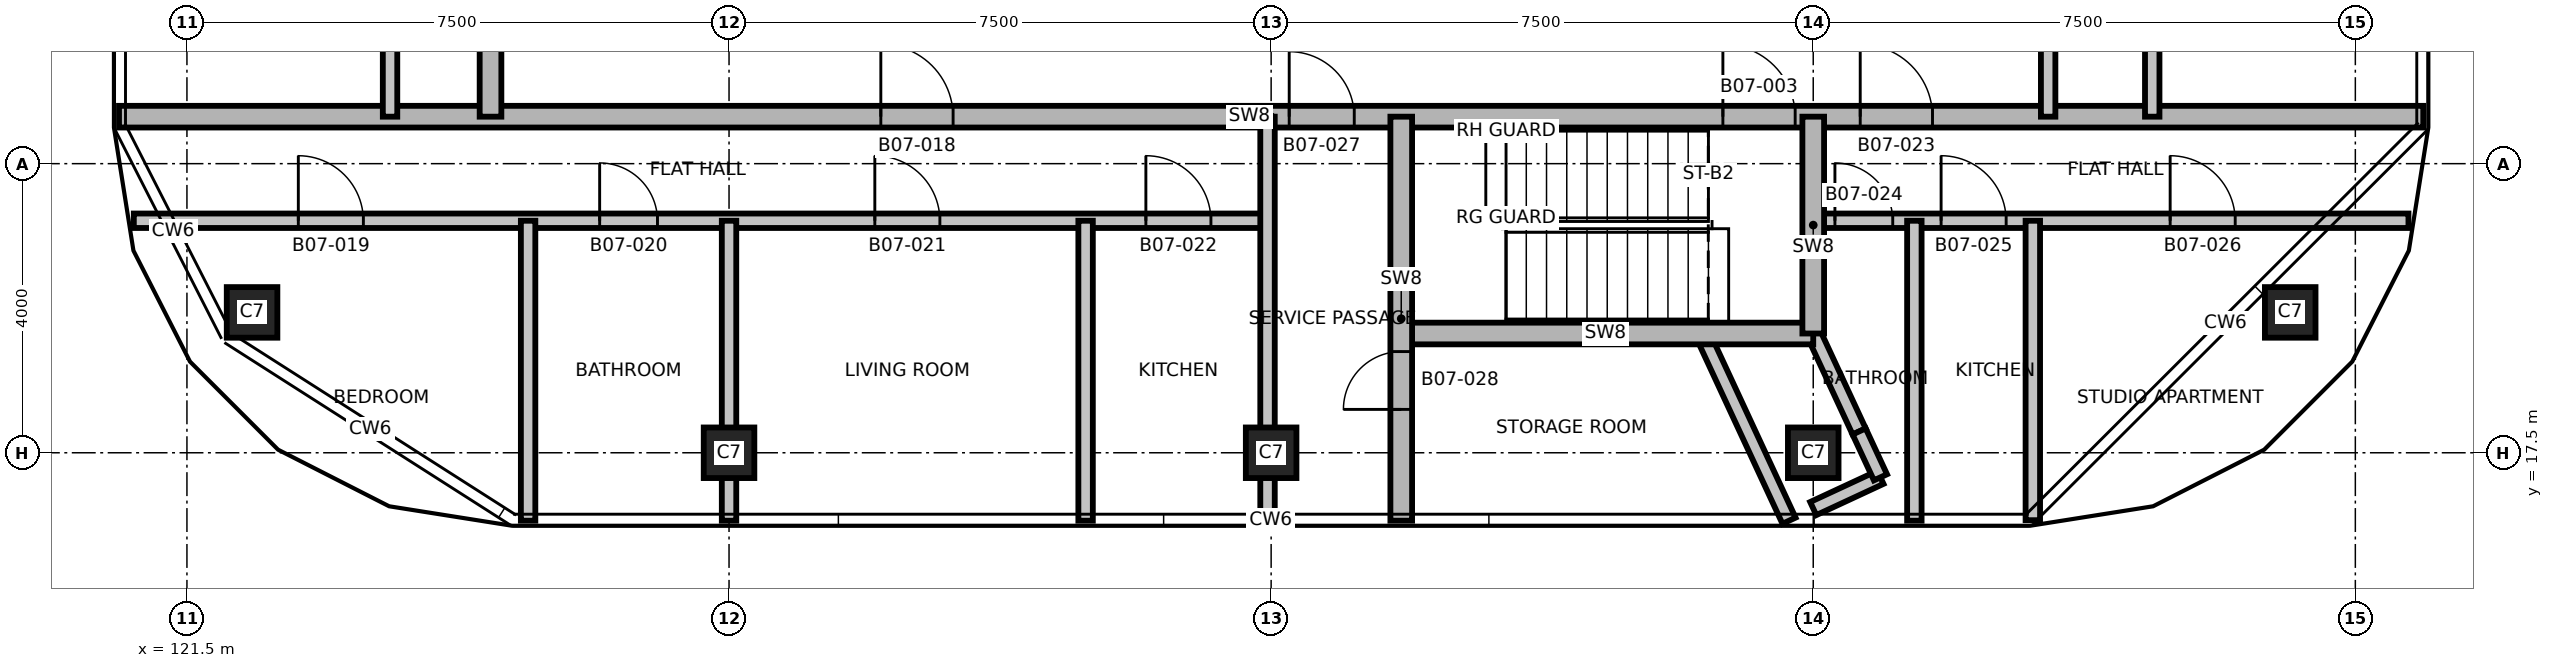
"""IFC4 building model, lengths in metres.
Left out: names, types, materials, properties, quantities, classifications, styles, units other than length and angle.
Written with IfcOpenShell. Run it as: python <this file> out.ifc"""

import sys

from ifc_helpers import new_model, si_unit, direction, frame, frame_2d, origin, origin_2d, place, context, subcontext, project, spatial, rectangle, extrude, element, fill, save


model = new_model("IFC4")
c1 = context("Model", 3, precision=1e-05, world=origin(), true_north=direction((0.0, 1.0)))
c2 = subcontext(c1, "Body", "Model", "MODEL_VIEW")
j1 = project(units=[si_unit("LENGTHUNIT", "METRE"), si_unit("PLANEANGLEUNIT", "RADIAN")], contexts=[c1])
p1 = place(None, origin())
s1 = spatial("IfcSite", under=j1, at=p1, CompositionType="ELEMENT")
p2 = place(p1, origin())
s2 = spatial("IfcBuilding", under=s1, at=p2, CompositionType="ELEMENT")
p3 = place(p2, frame((0.0, 0.0, 87.1)))
s3 = spatial("IfcBuildingStorey", under=s2, at=p3, CompositionType="ELEMENT", Elevation=87.1)
for number, where, z_axis, x_axis in (
    (1, (129.0, 17.5, 0.0), (0.0, 0.0, 1.0), (1.0, 0.0, 0.0)),
    (2, (136.5, 17.5, 0.0), (0.0, 0.0, 1.0), (1.0, 0.0, 0.0)),
    (3, (144.0, 17.5, 0.0), (0.0, 0.0, 1.0), (1.0, 0.0, 0.0)),
    (4, (122.401, 19.442, 0.0), (0.0, 0.0, 1.0), (1.0, 0.0, 0.0)),
    (5, (150.599, 19.442, 0.0), (0.0, 0.0, 1.0), (1.0, 0.0, 0.0)),
):
    element("IfcColumn", number, at=place(p3, frame(where, z_axis=z_axis, x_axis=x_axis)), inside=s3, PredefinedType="COLUMN", context=c2, shape_type="SweptSolid", body=[
        extrude(rectangle(XDim=0.7, YDim=0.7, at=origin_2d()), origin(), (0.0, 0.0, 1.0), 3.7),
    ])
p4 = place(p3, frame((142.463, 19.15, 0.0), z_axis=(0.0, 0.0, 1.0), x_axis=(0.421030913131, -0.90704628889, 0.0)))
e6 = element("IfcWall", 6, at=p4, inside=s3, PredefinedType="PARTITIONING", context=c2, shape_type="SweptSolid", body=[
    extrude(rectangle(XDim=2.855, YDim=0.2, at=frame_2d((1.428, 0.0))), origin(), (0.0, 0.0, 1.0), 3.4),
])
p5 = place(p3, frame((144.0, 16.728, 0.0), z_axis=(0.0, 0.0, 1.0), x_axis=(0.906960240365, 0.42121624185, 0.0)))
e7 = element("IfcWall", 7, at=p5, inside=s3, PredefinedType="PARTITIONING", context=c2, shape_type="SweptSolid", body=[
    extrude(rectangle(XDim=1.025, YDim=0.2, at=frame_2d((0.513, 0.0))), origin(), (0.0, 0.0, 1.0), 3.4),
])
p6 = place(p3, frame((144.0, 19.163, 0.0), z_axis=(0.0, 0.0, 1.0), x_axis=(0.420997169079, -0.907061951372, 0.0)))
e8 = element("IfcWall", 8, at=p6, inside=s3, PredefinedType="PARTITIONING", context=c2, shape_type="SweptSolid", body=[
    extrude(rectangle(XDim=1.508, YDim=0.2, at=frame_2d((0.754, 0.0))), origin(), (0.0, 0.0, 1.0), 3.4),
])
p7 = place(p3, frame((144.635, 17.795, 0.0), z_axis=(0.0, 0.0, 1.0), x_axis=(0.421223998033, -0.906956638148, 0.0)))
e9 = element("IfcWall", 9, at=p7, inside=s3, PredefinedType="PARTITIONING", context=c2, shape_type="SweptSolid", body=[
    extrude(rectangle(XDim=0.7, YDim=0.2, at=frame_2d((0.35, 0.0))), origin(), (0.0, 0.0, 1.0), 3.4),
])
p8 = place(p3, frame((138.25, 19.15, 0.0), z_axis=(0.0, 0.0, 1.0), x_axis=(1.0, 0.0, 0.0)))
e10 = element("IfcWall", 10, at=p8, inside=s3, PredefinedType="SHEAR", context=c2, shape_type="SweptSolid", body=[
    extrude(rectangle(XDim=5.75, YDim=0.3, at=frame_2d((2.875, 0.0))), origin(), (0.0, 0.0, 1.0), 3.4),
])
p9 = place(p3, frame((120.765, 20.71, 0.0), z_axis=(0.0, 0.0, 1.0), x_axis=(1.0, 0.0, 0.0)))
e11 = element("IfcWall", 11, at=p9, inside=s3, PredefinedType="PARTITIONING", context=c2, shape_type="SweptSolid", body=[
    extrude(rectangle(XDim=15.735, YDim=0.2, at=frame_2d((7.868, 0.0))), origin(), (0.0, 0.0, 1.0), 3.4),
])
p10 = place(p9, frame((2.276, 0.0, 0.0)))
e12 = element("IfcOpeningElement", 12, at=p10, cuts=e11, PredefinedType="OPENING", context=c2, shape_type="SweptSolid", body=[
    extrude(rectangle(XDim=0.9, YDim=2.1, at=frame_2d((0.45, 1.05))), frame((0.0, 0.11, 0.0), z_axis=(0.0, -1.0, 0.0), x_axis=(1.0, 0.0, 0.0)), (0.0, 0.0, 1.0), 0.22),
])
p11 = place(p9, frame((6.445, 0.0, 0.0)))
e13 = element("IfcOpeningElement", 13, at=p11, cuts=e11, PredefinedType="OPENING", context=c2, shape_type="SweptSolid", body=[
    extrude(rectangle(XDim=0.8, YDim=2.1, at=frame_2d((0.4, 1.05))), frame((0.0, 0.11, 0.0), z_axis=(0.0, -1.0, 0.0), x_axis=(1.0, 0.0, 0.0)), (0.0, 0.0, 1.0), 0.22),
])
p12 = place(p9, frame((10.252, 0.0, 0.0)))
e14 = element("IfcOpeningElement", 14, at=p12, cuts=e11, PredefinedType="OPENING", context=c2, shape_type="SweptSolid", body=[
    extrude(rectangle(XDim=0.9, YDim=2.1, at=frame_2d((0.45, 1.05))), frame((0.0, 0.11, 0.0), z_axis=(0.0, -1.0, 0.0), x_axis=(1.0, 0.0, 0.0)), (0.0, 0.0, 1.0), 0.22),
])
p13 = place(p9, frame((14.002, 0.0, 0.0)))
e15 = element("IfcOpeningElement", 15, at=p13, cuts=e11, PredefinedType="OPENING", context=c2, shape_type="SweptSolid", body=[
    extrude(rectangle(XDim=0.9, YDim=2.1, at=frame_2d((0.45, 1.05))), frame((0.0, 0.11, 0.0), z_axis=(0.0, -1.0, 0.0), x_axis=(1.0, 0.0, 0.0)), (0.0, 0.0, 1.0), 0.22),
])
p14 = place(p3, frame((144.0, 20.71, 0.0), z_axis=(0.0, 0.0, 1.0), x_axis=(1.0, 0.0, 0.0)))
e16 = element("IfcWall", 16, at=p14, inside=s3, PredefinedType="PARTITIONING", context=c2, shape_type="SweptSolid", body=[
    extrude(rectangle(XDim=8.235, YDim=0.2, at=frame_2d((4.118, 0.0))), origin(), (0.0, 0.0, 1.0), 3.4),
])
p15 = place(p14, frame((0.3, 0.0, 0.0)))
e17 = element("IfcOpeningElement", 17, at=p15, cuts=e16, PredefinedType="OPENING", context=c2, shape_type="SweptSolid", body=[
    extrude(rectangle(XDim=0.8, YDim=2.1, at=frame_2d((0.4, 1.05))), frame((0.0, 0.11, 0.0), z_axis=(0.0, -1.0, 0.0), x_axis=(1.0, 0.0, 0.0)), (0.0, 0.0, 1.0), 0.22),
])
p16 = place(p14, frame((1.769, 0.0, 0.0)))
e18 = element("IfcOpeningElement", 18, at=p16, cuts=e16, PredefinedType="OPENING", context=c2, shape_type="SweptSolid", body=[
    extrude(rectangle(XDim=0.9, YDim=2.1, at=frame_2d((0.45, 1.05))), frame((0.0, 0.11, 0.0), z_axis=(0.0, -1.0, 0.0), x_axis=(1.0, 0.0, 0.0)), (0.0, 0.0, 1.0), 0.22),
])
p17 = place(p14, frame((4.938, 0.0, 0.0)))
e19 = element("IfcOpeningElement", 19, at=p17, cuts=e16, PredefinedType="OPENING", context=c2, shape_type="SweptSolid", body=[
    extrude(rectangle(XDim=0.9, YDim=2.1, at=frame_2d((0.45, 1.05))), frame((0.0, 0.11, 0.0), z_axis=(0.0, -1.0, 0.0), x_axis=(1.0, 0.0, 0.0)), (0.0, 0.0, 1.0), 0.22),
])
p18 = place(p3, frame((120.56, 22.15, 0.0), z_axis=(0.0, 0.0, 1.0), x_axis=(1.0, 0.0, 0.0)))
e20 = element("IfcWall", 20, at=p18, inside=s3, PredefinedType="SHEAR", context=c2, shape_type="SweptSolid", body=[
    extrude(rectangle(XDim=31.88, YDim=0.3, at=frame_2d((15.94, 0.0))), origin(), (0.0, 0.0, 1.0), 3.4),
])
p19 = place(p18, frame((22.19, 0.0, 0.0)))
e21 = element("IfcOpeningElement", 21, at=p19, cuts=e20, PredefinedType="OPENING", context=c2, shape_type="SweptSolid", body=[
    extrude(rectangle(XDim=1.0, YDim=2.1, at=frame_2d((0.5, 1.05))), frame((0.0, 0.16, 0.0), z_axis=(0.0, -1.0, 0.0), x_axis=(1.0, 0.0, 0.0)), (0.0, 0.0, 1.0), 0.32),
])
p20 = place(p18, frame((10.54, 0.0, 0.0)))
e22 = element("IfcOpeningElement", 22, at=p20, cuts=e20, PredefinedType="OPENING", context=c2, shape_type="SweptSolid", body=[
    extrude(rectangle(XDim=1.0, YDim=2.1, at=frame_2d((0.5, 1.05))), frame((0.0, 0.16, 0.0), z_axis=(0.0, -1.0, 0.0), x_axis=(1.0, 0.0, 0.0)), (0.0, 0.0, 1.0), 0.32),
])
p21 = place(p18, frame((24.09, 0.0, 0.0)))
e23 = element("IfcOpeningElement", 23, at=p21, cuts=e20, PredefinedType="OPENING", context=c2, shape_type="SweptSolid", body=[
    extrude(rectangle(XDim=1.0, YDim=2.1, at=frame_2d((0.5, 1.05))), frame((0.0, 0.16, 0.0), z_axis=(0.0, -1.0, 0.0), x_axis=(1.0, 0.0, 0.0)), (0.0, 0.0, 1.0), 0.32),
])
p22 = place(p18, frame((16.19, 0.0, 0.0)))
e24 = element("IfcOpeningElement", 24, at=p22, cuts=e20, PredefinedType="OPENING", context=c2, shape_type="SweptSolid", body=[
    extrude(rectangle(XDim=0.9, YDim=2.1, at=frame_2d((0.45, 1.05))), frame((0.0, 0.16, 0.0), z_axis=(0.0, -1.0, 0.0), x_axis=(1.0, 0.0, 0.0)), (0.0, 0.0, 1.0), 0.32),
])
p23 = place(p3, frame((124.31, 22.15, 0.0), z_axis=(0.0, 0.0, 1.0), x_axis=(0.0, 1.0, 0.0)))
e25 = element("IfcWall", 25, at=p23, inside=s3, PredefinedType="PARTITIONING", context=c2, shape_type="SweptSolid", body=[
    extrude(rectangle(XDim=17.7, YDim=0.2, at=frame_2d((8.85, 0.0))), origin(), (0.0, 0.0, 1.0), 3.4),
])
p24 = place(p23, frame((1.725, 0.0, 0.0)))
e26 = element("IfcOpeningElement", 26, at=p24, cuts=e25, PredefinedType="OPENING", context=c2, shape_type="SweptSolid", body=[
    extrude(rectangle(XDim=0.9, YDim=2.1, at=frame_2d((0.45, 1.05))), frame((0.0, 0.11, 0.0), z_axis=(0.0, -1.0, 0.0), x_axis=(1.0, 0.0, 0.0)), (0.0, 0.0, 1.0), 0.22),
])
p25 = place(p23, frame((6.867, 0.0, 0.0)))
e27 = element("IfcOpeningElement", 27, at=p25, cuts=e25, PredefinedType="OPENING", context=c2, shape_type="SweptSolid", body=[
    extrude(rectangle(XDim=0.9, YDim=2.1, at=frame_2d((0.45, 1.05))), frame((0.0, 0.11, 0.0), z_axis=(0.0, -1.0, 0.0), x_axis=(1.0, 0.0, 0.0)), (0.0, 0.0, 1.0), 0.22),
])
p26 = place(p23, frame((11.367, 0.0, 0.0)))
e28 = element("IfcOpeningElement", 28, at=p26, cuts=e25, PredefinedType="OPENING", context=c2, shape_type="SweptSolid", body=[
    extrude(rectangle(XDim=0.9, YDim=2.1, at=frame_2d((0.45, 1.05))), frame((0.0, 0.11, 0.0), z_axis=(0.0, -1.0, 0.0), x_axis=(1.0, 0.0, 0.0)), (0.0, 0.0, 1.0), 0.22),
])
p27 = place(p23, frame((14.378, 0.0, 0.0)))
e29 = element("IfcOpeningElement", 29, at=p27, cuts=e25, PredefinedType="OPENING", context=c2, shape_type="SweptSolid", body=[
    extrude(rectangle(XDim=0.9, YDim=2.1, at=frame_2d((0.45, 1.05))), frame((0.0, 0.11, 0.0), z_axis=(0.0, -1.0, 0.0), x_axis=(1.0, 0.0, 0.0)), (0.0, 0.0, 1.0), 0.22),
])
p28 = place(p23, frame((16.603, 0.0, 0.0)))
e30 = element("IfcOpeningElement", 30, at=p28, cuts=e25, PredefinedType="OPENING", context=c2, shape_type="SweptSolid", body=[
    extrude(rectangle(XDim=0.8, YDim=2.1, at=frame_2d((0.4, 1.05))), frame((0.0, 0.11, 0.0), z_axis=(0.0, -1.0, 0.0), x_axis=(1.0, 0.0, 0.0)), (0.0, 0.0, 1.0), 0.22),
])
p29 = place(p3, frame((125.7, 22.15, 0.0), z_axis=(0.0, 0.0, 1.0), x_axis=(0.0, 1.0, 0.0)))
e31 = element("IfcWall", 31, at=p29, inside=s3, PredefinedType="SHEAR", context=c2, shape_type="SweptSolid", body=[
    extrude(rectangle(XDim=17.7, YDim=0.3, at=frame_2d((8.85, 0.0))), origin(), (0.0, 0.0, 1.0), 3.4),
])
p30 = place(p29, frame((2.7, 0.0, 0.0)))
e32 = element("IfcOpeningElement", 32, at=p30, cuts=e31, PredefinedType="OPENING", context=c2, shape_type="SweptSolid", body=[
    extrude(rectangle(XDim=1.0, YDim=2.1, at=frame_2d((0.5, 1.05))), frame((0.0, 0.16, 0.0), z_axis=(0.0, -1.0, 0.0), x_axis=(1.0, 0.0, 0.0)), (0.0, 0.0, 1.0), 0.32),
])
for number, where, z_axis, x_axis in (
    (33, (126.22, 16.56, 0.0), (0.0, 0.0, 1.0), (0.0, 1.0, 0.0)),
    (34, (129.0, 16.56, 0.0), (0.0, 0.0, 1.0), (0.0, 1.0, 0.0)),
    (35, (133.933, 16.56, 0.0), (0.0, 0.0, 1.0), (0.0, 1.0, 0.0)),
):
    element("IfcWall", number, at=place(p3, frame(where, z_axis=z_axis, x_axis=x_axis)), inside=s3, PredefinedType="PARTITIONING", context=c2, shape_type="SweptSolid", body=[
        extrude(rectangle(XDim=4.15, YDim=0.2, at=frame_2d((2.075, 0.0))), origin(), (0.0, 0.0, 1.0), 3.4),
    ])
p31 = place(p3, frame((136.45, 16.56, 0.0), z_axis=(0.0, 0.0, 1.0), x_axis=(0.0, 1.0, 0.0)))
e36 = element("IfcWall", 36, at=p31, inside=s3, PredefinedType="PARTITIONING", context=c2, shape_type="SweptSolid", body=[
    extrude(rectangle(XDim=5.59, YDim=0.2, at=frame_2d((2.795, 0.0))), origin(), (0.0, 0.0, 1.0), 3.4),
])
p32 = place(p3, frame((138.3, 16.56, 0.0), z_axis=(0.0, 0.0, 1.0), x_axis=(0.0, 1.0, 0.0)))
e37 = element("IfcWall", 37, at=p32, inside=s3, PredefinedType="SHEAR", context=c2, shape_type="SweptSolid", body=[
    extrude(rectangle(XDim=5.59, YDim=0.3, at=frame_2d((2.795, 0.0))), origin(), (0.0, 0.0, 1.0), 3.4),
])
p33 = place(p32, frame((1.54, 0.0, 0.0)))
e38 = element("IfcOpeningElement", 38, at=p33, cuts=e37, PredefinedType="OPENING", context=c2, shape_type="SweptSolid", body=[
    extrude(rectangle(XDim=0.8, YDim=2.1, at=frame_2d((0.4, 1.05))), frame((0.0, 0.16, 0.0), z_axis=(0.0, -1.0, 0.0), x_axis=(1.0, 0.0, 0.0)), (0.0, 0.0, 1.0), 0.32),
])
p34 = place(p3, frame((144.0, 19.15, 0.0), z_axis=(0.0, 0.0, 1.0), x_axis=(0.0, 1.0, 0.0)))
e39 = element("IfcWall", 39, at=p34, inside=s3, PredefinedType="SHEAR", context=c2, shape_type="SweptSolid", body=[
    extrude(rectangle(XDim=3.0, YDim=0.3, at=frame_2d((1.5, 0.0))), origin(), (0.0, 0.0, 1.0), 3.4),
])
p35 = place(p3, frame((145.399, 16.56, 0.0), z_axis=(0.0, 0.0, 1.0), x_axis=(0.0, 1.0, 0.0)))
e40 = element("IfcWall", 40, at=p35, inside=s3, PredefinedType="PARTITIONING", context=c2, shape_type="SweptSolid", body=[
    extrude(rectangle(XDim=4.15, YDim=0.2, at=frame_2d((2.075, 0.0))), origin(), (0.0, 0.0, 1.0), 3.4),
])
p36 = place(p3, frame((147.038, 16.567, 0.0), z_axis=(0.0, 0.0, 1.0), x_axis=(0.0, 1.0, 0.0)))
e41 = element("IfcWall", 41, at=p36, inside=s3, PredefinedType="PARTITIONING", context=c2, shape_type="SweptSolid", body=[
    extrude(rectangle(XDim=4.143, YDim=0.2, at=frame_2d((2.072, 0.0))), origin(), (0.0, 0.0, 1.0), 3.4),
])
p37 = place(p3, frame((147.25, 22.15, 0.0), z_axis=(0.0, 0.0, 1.0), x_axis=(0.0, 1.0, 0.0)))
e42 = element("IfcWall", 42, at=p37, inside=s3, PredefinedType="PARTITIONING", context=c2, shape_type="SweptSolid", body=[
    extrude(rectangle(XDim=17.7, YDim=0.2, at=frame_2d((8.85, 0.0))), origin(), (0.0, 0.0, 1.0), 3.4),
])
p38 = place(p37, frame((2.65, 0.0, 0.0)))
e43 = element("IfcOpeningElement", 43, at=p38, cuts=e42, PredefinedType="OPENING", context=c2, shape_type="SweptSolid", body=[
    extrude(rectangle(XDim=1.0, YDim=2.1, at=frame_2d((0.5, 1.05))), frame((0.0, 0.11, 0.0), z_axis=(0.0, -1.0, 0.0), x_axis=(1.0, 0.0, 0.0)), (0.0, 0.0, 1.0), 0.22),
])
p39 = place(p3, frame((148.69, 22.15, 0.0), z_axis=(0.0, 0.0, 1.0), x_axis=(0.0, 1.0, 0.0)))
e44 = element("IfcWall", 44, at=p39, inside=s3, PredefinedType="PARTITIONING", context=c2, shape_type="SweptSolid", body=[
    extrude(rectangle(XDim=17.7, YDim=0.2, at=frame_2d((8.85, 0.0))), origin(), (0.0, 0.0, 1.0), 3.4),
])
p40 = place(p39, frame((1.028, 0.0, 0.0)))
e45 = element("IfcOpeningElement", 45, at=p40, cuts=e44, PredefinedType="OPENING", context=c2, shape_type="SweptSolid", body=[
    extrude(rectangle(XDim=0.9, YDim=2.1, at=frame_2d((0.45, 1.05))), frame((0.0, 0.11, 0.0), z_axis=(0.0, -1.0, 0.0), x_axis=(1.0, 0.0, 0.0)), (0.0, 0.0, 1.0), 0.22),
])
p41 = place(p39, frame((3.253, 0.0, 0.0)))
e46 = element("IfcOpeningElement", 46, at=p41, cuts=e44, PredefinedType="OPENING", context=c2, shape_type="SweptSolid", body=[
    extrude(rectangle(XDim=0.8, YDim=2.1, at=frame_2d((0.4, 1.05))), frame((0.0, 0.11, 0.0), z_axis=(0.0, -1.0, 0.0), x_axis=(1.0, 0.0, 0.0)), (0.0, 0.0, 1.0), 0.22),
])
p42 = place(p39, frame((6.867, 0.0, 0.0)))
e47 = element("IfcOpeningElement", 47, at=p42, cuts=e44, PredefinedType="OPENING", context=c2, shape_type="SweptSolid", body=[
    extrude(rectangle(XDim=0.9, YDim=2.1, at=frame_2d((0.45, 1.05))), frame((0.0, 0.11, 0.0), z_axis=(0.0, -1.0, 0.0), x_axis=(1.0, 0.0, 0.0)), (0.0, 0.0, 1.0), 0.22),
])
p43 = place(p39, frame((11.367, 0.0, 0.0)))
e48 = element("IfcOpeningElement", 48, at=p43, cuts=e44, PredefinedType="OPENING", context=c2, shape_type="SweptSolid", body=[
    extrude(rectangle(XDim=0.9, YDim=2.1, at=frame_2d((0.45, 1.05))), frame((0.0, 0.11, 0.0), z_axis=(0.0, -1.0, 0.0), x_axis=(1.0, 0.0, 0.0)), (0.0, 0.0, 1.0), 0.22),
])
p44 = place(p39, frame((15.075, 0.0, 0.0)))
e49 = element("IfcOpeningElement", 49, at=p44, cuts=e44, PredefinedType="OPENING", context=c2, shape_type="SweptSolid", body=[
    extrude(rectangle(XDim=0.9, YDim=2.1, at=frame_2d((0.45, 1.05))), frame((0.0, 0.11, 0.0), z_axis=(0.0, -1.0, 0.0), x_axis=(1.0, 0.0, 0.0)), (0.0, 0.0, 1.0), 0.22),
])
p45 = place(p19, origin())
e50 = element("IfcDoor", 50, at=p45, inside=s3, OperationType="SINGLE_SWING_LEFT", PredefinedType="DOOR", context=c2, shape_type="SweptSolid", body=[
    extrude(rectangle(XDim=1.0, YDim=2.1, at=frame_2d((0.5, 1.05))), frame((0.0, 0.025, 0.0), z_axis=(0.0, -1.0, 0.0), x_axis=(1.0, 0.0, 0.0)), (0.0, 0.0, 1.0), 0.05),
])
fill(e21, e50)
p46 = place(p20, origin())
e51 = element("IfcDoor", 51, at=p46, inside=s3, OperationType="SINGLE_SWING_RIGHT", PredefinedType="DOOR", context=c2, shape_type="SweptSolid", body=[
    extrude(rectangle(XDim=1.0, YDim=2.1, at=frame_2d((0.5, 1.05))), frame((0.0, 0.025, 0.0), z_axis=(0.0, -1.0, 0.0), x_axis=(1.0, 0.0, 0.0)), (0.0, 0.0, 1.0), 0.05),
])
fill(e22, e51)
p47 = place(p10, origin())
e52 = element("IfcDoor", 52, at=p47, inside=s3, OperationType="SINGLE_SWING_LEFT", PredefinedType="DOOR", context=c2, shape_type="SweptSolid", body=[
    extrude(rectangle(XDim=0.9, YDim=2.1, at=frame_2d((0.45, 1.05))), frame((0.0, 0.025, 0.0), z_axis=(0.0, -1.0, 0.0), x_axis=(1.0, 0.0, 0.0)), (0.0, 0.0, 1.0), 0.05),
])
fill(e12, e52)
p48 = place(p11, origin())
e53 = element("IfcDoor", 53, at=p48, inside=s3, OperationType="SINGLE_SWING_RIGHT", PredefinedType="DOOR", context=c2, shape_type="SweptSolid", body=[
    extrude(rectangle(XDim=0.8, YDim=2.1, at=frame_2d((0.4, 1.05))), frame((0.0, 0.025, 0.0), z_axis=(0.0, -1.0, 0.0), x_axis=(1.0, 0.0, 0.0)), (0.0, 0.0, 1.0), 0.05),
])
fill(e13, e53)
p49 = place(p12, origin())
e54 = element("IfcDoor", 54, at=p49, inside=s3, OperationType="SINGLE_SWING_LEFT", PredefinedType="DOOR", context=c2, shape_type="SweptSolid", body=[
    extrude(rectangle(XDim=0.9, YDim=2.1, at=frame_2d((0.45, 1.05))), frame((0.0, 0.025, 0.0), z_axis=(0.0, -1.0, 0.0), x_axis=(1.0, 0.0, 0.0)), (0.0, 0.0, 1.0), 0.05),
])
fill(e14, e54)
p50 = place(p13, origin())
e55 = element("IfcDoor", 55, at=p50, inside=s3, OperationType="SINGLE_SWING_RIGHT", PredefinedType="DOOR", context=c2, shape_type="SweptSolid", body=[
    extrude(rectangle(XDim=0.9, YDim=2.1, at=frame_2d((0.45, 1.05))), frame((0.0, 0.025, 0.0), z_axis=(0.0, -1.0, 0.0), x_axis=(1.0, 0.0, 0.0)), (0.0, 0.0, 1.0), 0.05),
])
fill(e15, e55)
p51 = place(p21, origin())
e56 = element("IfcDoor", 56, at=p51, inside=s3, OperationType="SINGLE_SWING_LEFT", PredefinedType="DOOR", context=c2, shape_type="SweptSolid", body=[
    extrude(rectangle(XDim=1.0, YDim=2.1, at=frame_2d((0.5, 1.05))), frame((0.0, 0.025, 0.0), z_axis=(0.0, -1.0, 0.0), x_axis=(1.0, 0.0, 0.0)), (0.0, 0.0, 1.0), 0.05),
])
fill(e23, e56)
p52 = place(p15, origin())
e57 = element("IfcDoor", 57, at=p52, inside=s3, OperationType="SINGLE_SWING_RIGHT", PredefinedType="DOOR", context=c2, shape_type="SweptSolid", body=[
    extrude(rectangle(XDim=0.8, YDim=2.1, at=frame_2d((0.4, 1.05))), frame((0.0, 0.025, 0.0), z_axis=(0.0, -1.0, 0.0), x_axis=(1.0, 0.0, 0.0)), (0.0, 0.0, 1.0), 0.05),
])
fill(e17, e57)
p53 = place(p16, origin())
e58 = element("IfcDoor", 58, at=p53, inside=s3, OperationType="SINGLE_SWING_LEFT", PredefinedType="DOOR", context=c2, shape_type="SweptSolid", body=[
    extrude(rectangle(XDim=0.9, YDim=2.1, at=frame_2d((0.45, 1.05))), frame((0.0, 0.025, 0.0), z_axis=(0.0, -1.0, 0.0), x_axis=(1.0, 0.0, 0.0)), (0.0, 0.0, 1.0), 0.05),
])
fill(e18, e58)
p54 = place(p17, origin())
e59 = element("IfcDoor", 59, at=p54, inside=s3, OperationType="SINGLE_SWING_RIGHT", PredefinedType="DOOR", context=c2, shape_type="SweptSolid", body=[
    extrude(rectangle(XDim=0.9, YDim=2.1, at=frame_2d((0.45, 1.05))), frame((0.0, 0.025, 0.0), z_axis=(0.0, -1.0, 0.0), x_axis=(1.0, 0.0, 0.0)), (0.0, 0.0, 1.0), 0.05),
])
fill(e19, e59)
p55 = place(p22, origin())
e60 = element("IfcDoor", 60, at=p55, inside=s3, OperationType="SINGLE_SWING_LEFT", PredefinedType="DOOR", context=c2, shape_type="SweptSolid", body=[
    extrude(rectangle(XDim=0.9, YDim=2.1, at=frame_2d((0.45, 1.05))), frame((0.0, 0.025, 0.0), z_axis=(0.0, -1.0, 0.0), x_axis=(1.0, 0.0, 0.0)), (0.0, 0.0, 1.0), 0.05),
])
fill(e24, e60)
p56 = place(p33, origin())
e61 = element("IfcDoor", 61, at=p56, inside=s3, OperationType="SINGLE_SWING_RIGHT", PredefinedType="DOOR", context=c2, shape_type="SweptSolid", body=[
    extrude(rectangle(XDim=0.8, YDim=2.1, at=frame_2d((0.4, 1.05))), frame((0.0, 0.025, 0.0), z_axis=(0.0, -1.0, 0.0), x_axis=(1.0, 0.0, 0.0)), (0.0, 0.0, 1.0), 0.05),
])
fill(e38, e61)
save(model, sys.argv[1])
